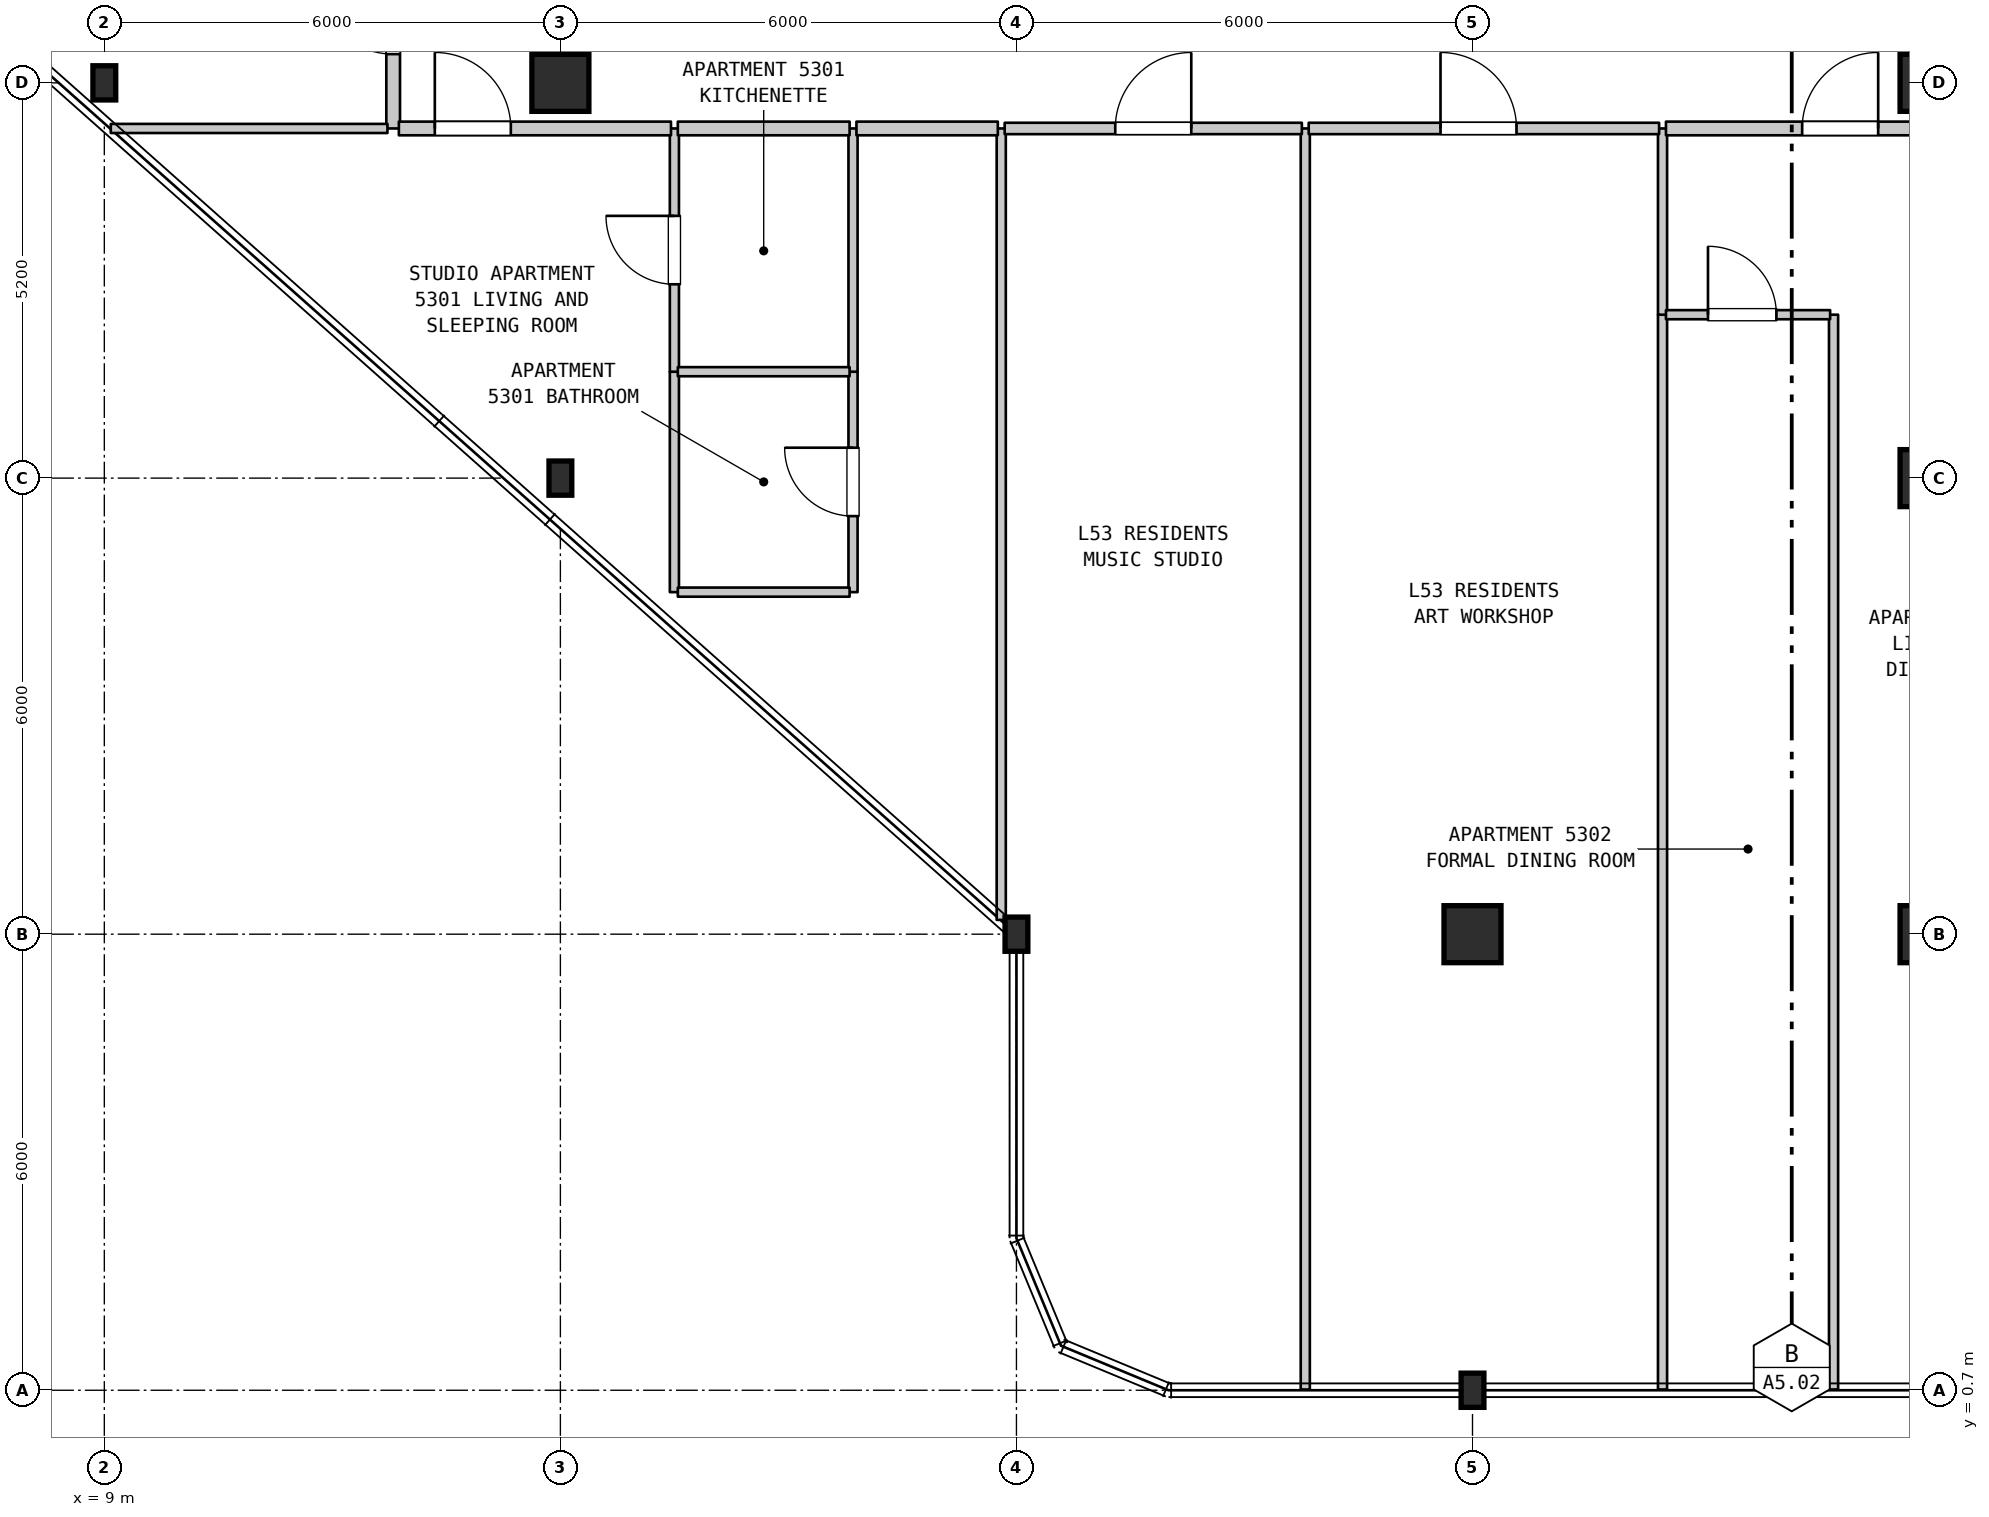
"""IFC4 building model, lengths in metres.
Left out: names, types, materials, properties, quantities, classifications, styles, units other than length and angle.
Written with IfcOpenShell. Run it as: python <this file> out.ifc"""

import sys

from ifc_helpers import new_model, si_unit, direction, frame, frame_2d, origin, origin_2d, place, context, subcontext, project, spatial, rectangle, i_section, extrude, element, fill, save


model = new_model("IFC4")
c1 = context("Model", 3, precision=1e-05, world=origin(), true_north=direction((0.0, 1.0)))
c2 = subcontext(c1, "Body", "Model", "MODEL_VIEW")
j1 = project(units=[si_unit("LENGTHUNIT", "METRE"), si_unit("PLANEANGLEUNIT", "RADIAN")], contexts=[c1])
p1 = place(None, origin())
s1 = spatial("IfcSite", under=j1, at=p1, CompositionType="ELEMENT")
p2 = place(p1, origin())
s2 = spatial("IfcBuilding", under=s1, at=p2, CompositionType="ELEMENT")
p3 = place(p2, frame((0.0, 0.0, 214.3)))
s3 = spatial("IfcBuildingStorey", under=s2, at=p3, CompositionType="ELEMENT", Elevation=214.3)
for number, where, z_axis, x_axis in (
    (1, (9.0, 17.9, 0.0), (0.0, 0.0, 1.0), (1.0, 0.0, 0.0)),
    (2, (15.0, 12.7, 0.0), (0.0, 0.0, 1.0), (1.0, 0.0, 0.0)),
):
    element("IfcColumn", number, at=place(p3, frame(where, z_axis=z_axis, x_axis=x_axis)), inside=s3, PredefinedType="COLUMN", context=c2, shape_type="SweptSolid", body=[
        extrude(i_section(OverallWidth=0.3, OverallDepth=0.45, WebThickness=0.014, FlangeThickness=0.026, FilletRadius=0.027, at=origin_2d()), origin(), (0.0, 0.0, 1.0), 3.7),
    ])
p4 = place(p3, frame((15.0, 17.9, 0.0), z_axis=(0.0, 0.0, 1.0), x_axis=(1.0, 0.0, 0.0)))
e3 = element("IfcColumn", 3, at=p4, inside=s3, PredefinedType="COLUMN", context=c2, shape_type="SweptSolid", body=[
    extrude(rectangle(XDim=0.75, YDim=0.75, at=origin_2d()), origin(), (0.0, 0.0, 1.0), 3.7),
])
for number, where, z_axis, x_axis in (
    (4, (21.0, 6.7, 0.0), (0.0, 0.0, 1.0), (1.0, 0.0, 0.0)),
    (5, (27.0, 0.7, 0.0), (0.0, 0.0, 1.0), (1.0, 0.0, 0.0)),
):
    element("IfcColumn", number, at=place(p3, frame(where, z_axis=z_axis, x_axis=x_axis)), inside=s3, PredefinedType="COLUMN", context=c2, shape_type="SweptSolid", body=[
        extrude(i_section(OverallWidth=0.3, OverallDepth=0.45, WebThickness=0.014, FlangeThickness=0.026, FilletRadius=0.027, at=origin_2d()), origin(), (0.0, 0.0, 1.0), 3.7),
    ])
for number, where, z_axis, x_axis in (
    (6, (27.0, 6.7, 0.0), (0.0, 0.0, 1.0), (1.0, 0.0, 0.0)),
    (7, (33.0, 6.7, 0.0), (0.0, 0.0, 1.0), (1.0, 0.0, 0.0)),
    (8, (33.0, 12.7, 0.0), (0.0, 0.0, 1.0), (1.0, 0.0, 0.0)),
    (9, (33.0, 17.9, 0.0), (0.0, 0.0, 1.0), (1.0, 0.0, 0.0)),
):
    element("IfcColumn", number, at=place(p3, frame(where, z_axis=z_axis, x_axis=x_axis)), inside=s3, PredefinedType="COLUMN", context=c2, shape_type="SweptSolid", body=[
        extrude(rectangle(XDim=0.75, YDim=0.75, at=origin_2d()), origin(), (0.0, 0.0, 1.0), 3.7),
    ])
p5 = place(p3, frame((12.8, 17.3, 0.0), z_axis=(0.0, 0.0, 1.0), x_axis=(0.0, 1.0, 0.0)))
e10 = element("IfcWall", 10, at=p5, inside=s3, PredefinedType="STANDARD", context=c2, shape_type="SweptSolid", body=[
    extrude(rectangle(XDim=3.1, YDim=0.18, at=frame_2d((1.55, 0.0))), origin(), (0.0, 0.0, 1.0), 3.38),
])
p6 = place(p5, frame((0.978, 0.0, 0.0)))
e11 = element("IfcOpeningElement", 11, at=p6, cuts=e10, PredefinedType="OPENING", context=c2, shape_type="SweptSolid", body=[
    extrude(rectangle(XDim=1.0, YDim=2.15, at=frame_2d((0.5, 1.075))), frame((0.0, 0.1, 0.0), z_axis=(0.0, -1.0, 0.0), x_axis=(1.0, 0.0, 0.0)), (0.0, 0.0, 1.0), 0.2),
])
p7 = place(p3, frame((16.5, 11.2, 0.0), z_axis=(0.0, 0.0, 1.0), x_axis=(0.0, 1.0, 0.0)))
e12 = element("IfcWall", 12, at=p7, inside=s3, PredefinedType="PARTITIONING", context=c2, shape_type="SweptSolid", body=[
    extrude(rectangle(XDim=2.9, YDim=0.12, at=frame_2d((1.45, 0.0))), origin(), (0.0, 0.0, 1.0), 3.38),
])
p8 = place(p3, frame((16.5, 14.1, 0.0), z_axis=(0.0, 0.0, 1.0), x_axis=(0.0, 1.0, 0.0)))
e13 = element("IfcWall", 13, at=p8, inside=s3, PredefinedType="PARTITIONING", context=c2, shape_type="SweptSolid", body=[
    extrude(rectangle(XDim=3.2, YDim=0.12, at=frame_2d((1.6, 0.0))), origin(), (0.0, 0.0, 1.0), 3.38),
])
p9 = place(p8, frame((1.15, 0.0, 0.0)))
e14 = element("IfcOpeningElement", 14, at=p9, cuts=e13, PredefinedType="OPENING", context=c2, shape_type="SweptSolid", body=[
    extrude(rectangle(XDim=0.9, YDim=2.15, at=frame_2d((0.45, 1.075))), frame((0.0, 0.07, 0.0), z_axis=(0.0, -1.0, 0.0), x_axis=(1.0, 0.0, 0.0)), (0.0, 0.0, 1.0), 0.14),
])
p10 = place(p3, frame((18.85, 11.2, 0.0), z_axis=(0.0, 0.0, 1.0), x_axis=(0.0, 1.0, 0.0)))
e15 = element("IfcWall", 15, at=p10, inside=s3, PredefinedType="PARTITIONING", context=c2, shape_type="SweptSolid", body=[
    extrude(rectangle(XDim=2.9, YDim=0.12, at=frame_2d((1.45, 0.0))), origin(), (0.0, 0.0, 1.0), 3.38),
])
p11 = place(p10, frame((1.0, 0.0, 0.0)))
e16 = element("IfcOpeningElement", 16, at=p11, cuts=e15, PredefinedType="OPENING", context=c2, shape_type="SweptSolid", body=[
    extrude(rectangle(XDim=0.9, YDim=2.1, at=frame_2d((0.45, 1.05))), frame((0.0, 0.07, 0.0), z_axis=(0.0, -1.0, 0.0), x_axis=(1.0, 0.0, 0.0)), (0.0, 0.0, 1.0), 0.14),
])
p12 = place(p3, frame((18.85, 14.1, 0.0), z_axis=(0.0, 0.0, 1.0), x_axis=(0.0, 1.0, 0.0)))
e17 = element("IfcWall", 17, at=p12, inside=s3, PredefinedType="PARTITIONING", context=c2, shape_type="SweptSolid", body=[
    extrude(rectangle(XDim=3.2, YDim=0.12, at=frame_2d((1.6, 0.0))), origin(), (0.0, 0.0, 1.0), 3.38),
])
p13 = place(p3, frame((20.8, 6.888, 0.0), z_axis=(0.0, 0.0, 1.0), x_axis=(0.0, 1.0, 0.0)))
e18 = element("IfcWall", 18, at=p13, inside=s3, PredefinedType="PARTITIONING", context=c2, shape_type="SweptSolid", body=[
    extrude(rectangle(XDim=10.412, YDim=0.12, at=frame_2d((5.206, 0.0))), origin(), (0.0, 0.0, 1.0), 3.38),
])
p14 = place(p3, frame((24.8, 0.71, 0.0), z_axis=(0.0, 0.0, 1.0), x_axis=(0.0, 1.0, 0.0)))
e19 = element("IfcWall", 19, at=p14, inside=s3, PredefinedType="PARTITIONING", context=c2, shape_type="SweptSolid", body=[
    extrude(rectangle(XDim=16.59, YDim=0.12, at=frame_2d((8.295, 0.0))), origin(), (0.0, 0.0, 1.0), 3.38),
])
p15 = place(p3, frame((29.5, 0.71, 0.0), z_axis=(0.0, 0.0, 1.0), x_axis=(0.0, 1.0, 0.0)))
e20 = element("IfcWall", 20, at=p15, inside=s3, PredefinedType="PARTITIONING", context=c2, shape_type="SweptSolid", body=[
    extrude(rectangle(XDim=14.14, YDim=0.12, at=frame_2d((7.07, 0.0))), origin(), (0.0, 0.0, 1.0), 3.38),
])
p16 = place(p3, frame((29.5, 14.85, 0.0), z_axis=(0.0, 0.0, 1.0), x_axis=(0.0, 1.0, 0.0)))
e21 = element("IfcWall", 21, at=p16, inside=s3, PredefinedType="PARTITIONING", context=c2, shape_type="SweptSolid", body=[
    extrude(rectangle(XDim=2.45, YDim=0.12, at=frame_2d((1.225, 0.0))), origin(), (0.0, 0.0, 1.0), 3.38),
])
p17 = place(p3, frame((31.75, 0.71, 0.0), z_axis=(0.0, 0.0, 1.0), x_axis=(0.0, 1.0, 0.0)))
e22 = element("IfcWall", 22, at=p17, inside=s3, PredefinedType="PARTITIONING", context=c2, shape_type="SweptSolid", body=[
    extrude(rectangle(XDim=14.14, YDim=0.12, at=frame_2d((7.07, 0.0))), origin(), (0.0, 0.0, 1.0), 3.38),
])
for number, where, z_axis, x_axis in (
    (23, (16.545, 11.2, 0.0), (0.0, 0.0, 1.0), (1.0, 0.0, 0.0)),
    (24, (16.545, 14.1, 0.0), (0.0, 0.0, 1.0), (1.0, 0.0, 0.0)),
):
    element("IfcWall", number, at=place(p3, frame(where, z_axis=z_axis, x_axis=x_axis)), inside=s3, PredefinedType="PARTITIONING", context=c2, shape_type="SweptSolid", body=[
        extrude(rectangle(XDim=2.26, YDim=0.12, at=frame_2d((1.13, 0.0))), origin(), (0.0, 0.0, 1.0), 3.38),
    ])
p18 = place(p3, frame((29.545, 14.85, 0.0), z_axis=(0.0, 0.0, 1.0), x_axis=(1.0, 0.0, 0.0)))
e25 = element("IfcWall", 25, at=p18, inside=s3, PredefinedType="PARTITIONING", context=c2, shape_type="SweptSolid", body=[
    extrude(rectangle(XDim=2.16, YDim=0.12, at=frame_2d((1.08, 0.0))), origin(), (0.0, 0.0, 1.0), 3.38),
])
p19 = place(p18, frame((0.553, 0.0, 0.0)))
e26 = element("IfcOpeningElement", 26, at=p19, cuts=e25, PredefinedType="OPENING", context=c2, shape_type="SweptSolid", body=[
    extrude(rectangle(XDim=0.9, YDim=2.15, at=frame_2d((0.45, 1.075))), frame((0.0, 0.07, 0.0), z_axis=(0.0, -1.0, 0.0), x_axis=(1.0, 0.0, 0.0)), (0.0, 0.0, 1.0), 0.14),
])
p20 = place(p3, frame((9.085, 17.3, 0.0), z_axis=(0.0, 0.0, 1.0), x_axis=(1.0, 0.0, 0.0)))
e27 = element("IfcWall", 27, at=p20, inside=s3, PredefinedType="PARTITIONING", context=c2, shape_type="SweptSolid", body=[
    extrude(rectangle(XDim=3.64, YDim=0.12, at=frame_2d((1.82, 0.0))), origin(), (0.0, 0.0, 1.0), 3.38),
])
p21 = place(p3, frame((12.875, 17.3, 0.0), z_axis=(0.0, 0.0, 1.0), x_axis=(1.0, 0.0, 0.0)))
e28 = element("IfcWall", 28, at=p21, inside=s3, PredefinedType="STANDARD", context=c2, shape_type="SweptSolid", body=[
    extrude(rectangle(XDim=3.58, YDim=0.18, at=frame_2d((1.79, 0.0))), origin(), (0.0, 0.0, 1.0), 3.38),
])
p22 = place(p21, frame((0.473, 0.0, 0.0)))
e29 = element("IfcOpeningElement", 29, at=p22, cuts=e28, PredefinedType="OPENING", context=c2, shape_type="SweptSolid", body=[
    extrude(rectangle(XDim=1.0, YDim=2.15, at=frame_2d((0.5, 1.075))), frame((0.0, 0.1, 0.0), z_axis=(0.0, -1.0, 0.0), x_axis=(1.0, 0.0, 0.0)), (0.0, 0.0, 1.0), 0.2),
])
p23 = place(p3, frame((16.545, 17.3, 0.0), z_axis=(0.0, 0.0, 1.0), x_axis=(1.0, 0.0, 0.0)))
e30 = element("IfcWall", 30, at=p23, inside=s3, PredefinedType="STANDARD", context=c2, shape_type="SweptSolid", body=[
    extrude(rectangle(XDim=2.26, YDim=0.18, at=frame_2d((1.13, 0.0))), origin(), (0.0, 0.0, 1.0), 3.38),
])
p24 = place(p3, frame((18.895, 17.3, 0.0), z_axis=(0.0, 0.0, 1.0), x_axis=(1.0, 0.0, 0.0)))
e31 = element("IfcWall", 31, at=p24, inside=s3, PredefinedType="STANDARD", context=c2, shape_type="SweptSolid", body=[
    extrude(rectangle(XDim=1.86, YDim=0.18, at=frame_2d((0.93, 0.0))), origin(), (0.0, 0.0, 1.0), 3.38),
])
p25 = place(p3, frame((20.845, 17.3, 0.0), z_axis=(0.0, 0.0, 1.0), x_axis=(1.0, 0.0, 0.0)))
e32 = element("IfcWall", 32, at=p25, inside=s3, PredefinedType="STANDARD", context=c2, shape_type="SweptSolid", body=[
    extrude(rectangle(XDim=3.91, YDim=0.15, at=frame_2d((1.955, 0.0))), origin(), (0.0, 0.0, 1.0), 3.38),
])
p26 = place(p25, frame((1.455, 0.0, 0.0)))
e33 = element("IfcOpeningElement", 33, at=p26, cuts=e32, PredefinedType="OPENING", context=c2, shape_type="SweptSolid", body=[
    extrude(rectangle(XDim=1.0, YDim=2.15, at=frame_2d((0.5, 1.075))), frame((0.0, 0.085, 0.0), z_axis=(0.0, -1.0, 0.0), x_axis=(1.0, 0.0, 0.0)), (0.0, 0.0, 1.0), 0.17),
])
p27 = place(p3, frame((24.845, 17.3, 0.0), z_axis=(0.0, 0.0, 1.0), x_axis=(1.0, 0.0, 0.0)))
e34 = element("IfcWall", 34, at=p27, inside=s3, PredefinedType="STANDARD", context=c2, shape_type="SweptSolid", body=[
    extrude(rectangle(XDim=4.61, YDim=0.15, at=frame_2d((2.305, 0.0))), origin(), (0.0, 0.0, 1.0), 3.38),
])
p28 = place(p27, frame((1.734, 0.0, 0.0)))
e35 = element("IfcOpeningElement", 35, at=p28, cuts=e34, PredefinedType="OPENING", context=c2, shape_type="SweptSolid", body=[
    extrude(rectangle(XDim=1.0, YDim=2.15, at=frame_2d((0.5, 1.075))), frame((0.0, 0.085, 0.0), z_axis=(0.0, -1.0, 0.0), x_axis=(1.0, 0.0, 0.0)), (0.0, 0.0, 1.0), 0.17),
])
p29 = place(p3, frame((29.545, 17.3, 0.0), z_axis=(0.0, 0.0, 1.0), x_axis=(1.0, 0.0, 0.0)))
e36 = element("IfcWall", 36, at=p29, inside=s3, PredefinedType="STANDARD", context=c2, shape_type="SweptSolid", body=[
    extrude(rectangle(XDim=5.095, YDim=0.18, at=frame_2d((2.547, 0.0))), origin(), (0.0, 0.0, 1.0), 3.38),
])
p30 = place(p29, frame((1.792, 0.0, 0.0)))
e37 = element("IfcOpeningElement", 37, at=p30, cuts=e36, PredefinedType="OPENING", context=c2, shape_type="SweptSolid", body=[
    extrude(rectangle(XDim=1.0, YDim=2.15, at=frame_2d((0.5, 1.075))), frame((0.0, 0.1, 0.0), z_axis=(0.0, -1.0, 0.0), x_axis=(1.0, 0.0, 0.0)), (0.0, 0.0, 1.0), 0.2),
])
p31 = place(p6, origin())
e38 = element("IfcDoor", 38, at=p31, inside=s3, OperationType="SINGLE_SWING_RIGHT", PredefinedType="DOOR", context=c2, shape_type="SweptSolid", body=[
    extrude(rectangle(XDim=1.0, YDim=2.15, at=frame_2d((0.5, 1.075))), frame((0.0, 0.025, 0.0), z_axis=(0.0, -1.0, 0.0), x_axis=(1.0, 0.0, 0.0)), (0.0, 0.0, 1.0), 0.05),
])
fill(e11, e38)
p32 = place(p9, origin())
e39 = element("IfcDoor", 39, at=p32, inside=s3, OperationType="SINGLE_SWING_RIGHT", PredefinedType="DOOR", context=c2, shape_type="SweptSolid", body=[
    extrude(rectangle(XDim=0.9, YDim=2.15, at=frame_2d((0.45, 1.075))), frame((0.0, 0.025, 0.0), z_axis=(0.0, -1.0, 0.0), x_axis=(1.0, 0.0, 0.0)), (0.0, 0.0, 1.0), 0.05),
])
fill(e14, e39)
p33 = place(p11, origin())
e40 = element("IfcDoor", 40, at=p33, inside=s3, OperationType="SINGLE_SWING_RIGHT", PredefinedType="DOOR", context=c2, shape_type="SweptSolid", body=[
    extrude(rectangle(XDim=0.9, YDim=2.1, at=frame_2d((0.45, 1.05))), frame((0.0, 0.025, 0.0), z_axis=(0.0, -1.0, 0.0), x_axis=(1.0, 0.0, 0.0)), (0.0, 0.0, 1.0), 0.05),
])
fill(e16, e40)
p34 = place(p19, origin())
e41 = element("IfcDoor", 41, at=p34, inside=s3, OperationType="SINGLE_SWING_LEFT", PredefinedType="DOOR", context=c2, shape_type="SweptSolid", body=[
    extrude(rectangle(XDim=0.9, YDim=2.15, at=frame_2d((0.45, 1.075))), frame((0.0, 0.025, 0.0), z_axis=(0.0, -1.0, 0.0), x_axis=(1.0, 0.0, 0.0)), (0.0, 0.0, 1.0), 0.05),
])
fill(e26, e41)
p35 = place(p22, origin())
e42 = element("IfcDoor", 42, at=p35, inside=s3, OperationType="SINGLE_SWING_LEFT", PredefinedType="DOOR", context=c2, shape_type="SweptSolid", body=[
    extrude(rectangle(XDim=1.0, YDim=2.15, at=frame_2d((0.5, 1.075))), frame((0.0, 0.025, 0.0), z_axis=(0.0, -1.0, 0.0), x_axis=(1.0, 0.0, 0.0)), (0.0, 0.0, 1.0), 0.05),
])
fill(e29, e42)
p36 = place(p26, origin())
e43 = element("IfcDoor", 43, at=p36, inside=s3, OperationType="SINGLE_SWING_RIGHT", PredefinedType="DOOR", context=c2, shape_type="SweptSolid", body=[
    extrude(rectangle(XDim=1.0, YDim=2.15, at=frame_2d((0.5, 1.075))), frame((0.0, 0.025, 0.0), z_axis=(0.0, -1.0, 0.0), x_axis=(1.0, 0.0, 0.0)), (0.0, 0.0, 1.0), 0.05),
])
fill(e33, e43)
p37 = place(p28, origin())
e44 = element("IfcDoor", 44, at=p37, inside=s3, OperationType="SINGLE_SWING_LEFT", PredefinedType="DOOR", context=c2, shape_type="SweptSolid", body=[
    extrude(rectangle(XDim=1.0, YDim=2.15, at=frame_2d((0.5, 1.075))), frame((0.0, 0.025, 0.0), z_axis=(0.0, -1.0, 0.0), x_axis=(1.0, 0.0, 0.0)), (0.0, 0.0, 1.0), 0.05),
])
fill(e35, e44)
p38 = place(p30, origin())
e45 = element("IfcDoor", 45, at=p38, inside=s3, OperationType="SINGLE_SWING_RIGHT", PredefinedType="DOOR", context=c2, shape_type="SweptSolid", body=[
    extrude(rectangle(XDim=1.0, YDim=2.15, at=frame_2d((0.5, 1.075))), frame((0.0, 0.025, 0.0), z_axis=(0.0, -1.0, 0.0), x_axis=(1.0, 0.0, 0.0)), (0.0, 0.0, 1.0), 0.05),
])
fill(e37, e45)
save(model, sys.argv[1])
